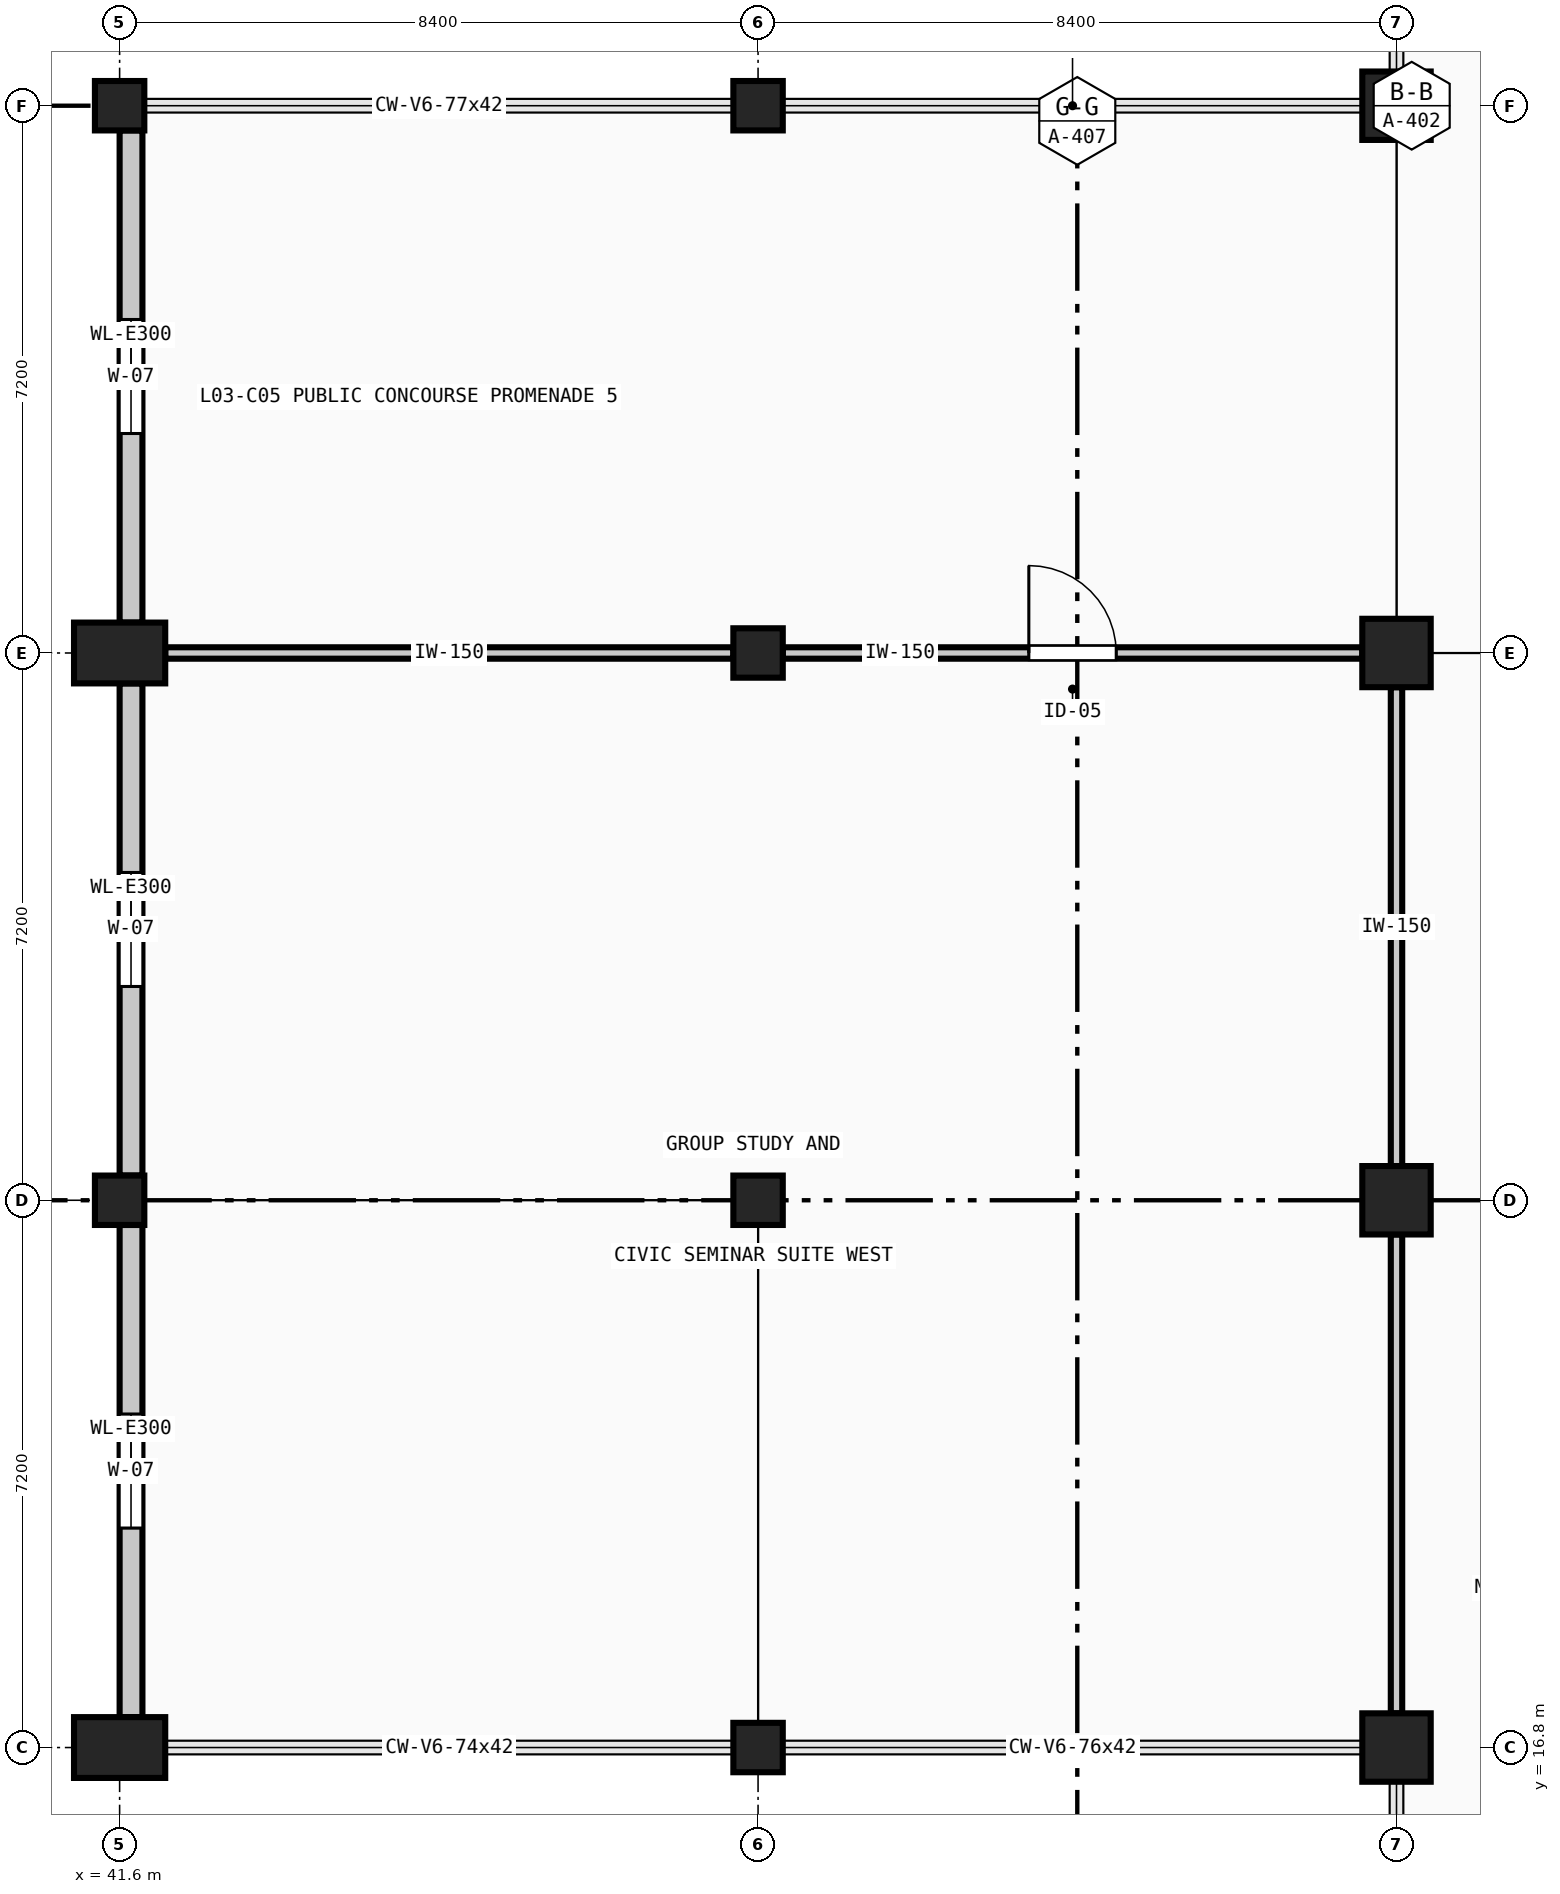
"""IFC4 building model, lengths in metres.
Left out: names, types, materials, properties, quantities, classifications, styles, units other than length and angle.
Written with IfcOpenShell. Run it as: python <this file> out.ifc"""

import sys

from ifc_helpers import new_model, si_unit, direction, frame, frame_2d, origin, origin_2d, place, context, subcontext, project, spatial, rectangle, extrude, element, fill, save


model = new_model("IFC4")
c1 = context("Model", 3, precision=1e-05, world=origin(), true_north=direction((0.0, 1.0)))
c2 = subcontext(c1, "Body", "Model", "MODEL_VIEW")
j1 = project(units=[si_unit("LENGTHUNIT", "METRE"), si_unit("PLANEANGLEUNIT", "RADIAN")], contexts=[c1])
p1 = place(None, origin())
s1 = spatial("IfcSite", under=j1, at=p1, CompositionType="ELEMENT")
p2 = place(p1, origin())
s2 = spatial("IfcBuilding", under=s1, at=p2, CompositionType="ELEMENT")
p3 = place(p2, frame((0.0, 0.0, 14.4)))
s3 = spatial("IfcBuildingStorey", under=s2, at=p3, CompositionType="ELEMENT", Elevation=14.4)
p4 = place(p3, frame((41.6, 16.8, 0.0), z_axis=(0.0, 0.0, 1.0), x_axis=(1.0, 0.0, 0.0)))
e1 = element("IfcColumn", 1, at=p4, inside=s3, PredefinedType="COLUMN", context=c2, shape_type="SweptSolid", body=[
    extrude(rectangle(XDim=1.2, YDim=0.8, at=origin_2d()), origin(), (0.0, 0.0, 1.0), 4.48),
])
p5 = place(p3, frame((41.6, 24.0, 0.0), z_axis=(0.0, 0.0, 1.0), x_axis=(1.0, 0.0, 0.0)))
e2 = element("IfcColumn", 2, at=p5, inside=s3, PredefinedType="COLUMN", context=c2, shape_type="SweptSolid", body=[
    extrude(rectangle(XDim=0.65, YDim=0.65, at=origin_2d()), origin(), (0.0, 0.0, 1.0), 4.48),
])
p6 = place(p3, frame((41.6, 31.2, 0.0), z_axis=(0.0, 0.0, 1.0), x_axis=(1.0, 0.0, 0.0)))
e3 = element("IfcColumn", 3, at=p6, inside=s3, PredefinedType="COLUMN", context=c2, shape_type="SweptSolid", body=[
    extrude(rectangle(XDim=1.2, YDim=0.8, at=origin_2d()), origin(), (0.0, 0.0, 1.0), 4.48),
])
for number, where, z_axis, x_axis in (
    (4, (41.6, 38.4, 0.0), (0.0, 0.0, 1.0), (1.0, 0.0, 0.0)),
    (5, (50.0, 16.8, 0.0), (0.0, 0.0, 1.0), (1.0, 0.0, 0.0)),
    (6, (50.0, 24.0, 0.0), (0.0, 0.0, 1.0), (1.0, 0.0, 0.0)),
    (7, (50.0, 31.2, 0.0), (0.0, 0.0, 1.0), (1.0, 0.0, 0.0)),
    (8, (50.0, 38.4, 0.0), (0.0, 0.0, 1.0), (1.0, 0.0, 0.0)),
):
    element("IfcColumn", number, at=place(p3, frame(where, z_axis=z_axis, x_axis=x_axis)), inside=s3, PredefinedType="COLUMN", context=c2, shape_type="SweptSolid", body=[
        extrude(rectangle(XDim=0.65, YDim=0.65, at=origin_2d()), origin(), (0.0, 0.0, 1.0), 4.48),
    ])
for number, where, z_axis, x_axis in (
    (9, (58.4, 16.8, 0.0), (0.0, 0.0, 1.0), (1.0, 0.0, 0.0)),
    (10, (58.4, 24.0, 0.0), (0.0, 0.0, 1.0), (1.0, 0.0, 0.0)),
    (11, (58.4, 31.2, 0.0), (0.0, 0.0, 1.0), (1.0, 0.0, 0.0)),
    (12, (58.4, 38.4, 0.0), (0.0, 0.0, 1.0), (1.0, 0.0, 0.0)),
):
    element("IfcColumn", number, at=place(p3, frame(where, z_axis=z_axis, x_axis=x_axis)), inside=s3, PredefinedType="COLUMN", context=c2, shape_type="SweptSolid", body=[
        extrude(rectangle(XDim=0.9, YDim=0.9, at=origin_2d()), origin(), (0.0, 0.0, 1.0), 4.48),
    ])
p7 = place(p3, frame((41.75, 17.2, 0.0), z_axis=(0.0, 0.0, 1.0), x_axis=(0.0, 1.0, 0.0)))
e13 = element("IfcWall", 13, at=p7, inside=s3, PredefinedType="SOLIDWALL", context=c2, shape_type="SweptSolid", body=[
    extrude(rectangle(XDim=6.475, YDim=0.3, at=frame_2d((3.238, 0.0))), origin(), (0.0, 0.0, 1.0), 4.23),
])
p8 = place(p7, frame((2.488, 0.0, 0.9)))
e14 = element("IfcOpeningElement", 14, at=p8, cuts=e13, PredefinedType="OPENING", context=c2, shape_type="SweptSolid", body=[
    extrude(rectangle(XDim=1.5, YDim=2.4, at=frame_2d((0.75, 1.2))), frame((0.0, 0.16, 0.0), z_axis=(0.0, -1.0, 0.0), x_axis=(1.0, 0.0, 0.0)), (0.0, 0.0, 1.0), 0.32),
])
p9 = place(p3, frame((41.75, 24.325, 0.0), z_axis=(0.0, 0.0, 1.0), x_axis=(0.0, 1.0, 0.0)))
e15 = element("IfcWall", 15, at=p9, inside=s3, PredefinedType="SOLIDWALL", context=c2, shape_type="SweptSolid", body=[
    extrude(rectangle(XDim=6.475, YDim=0.3, at=frame_2d((3.238, 0.0))), origin(), (0.0, 0.0, 1.0), 4.23),
])
p10 = place(p9, frame((2.488, 0.0, 0.9)))
e16 = element("IfcOpeningElement", 16, at=p10, cuts=e15, PredefinedType="OPENING", context=c2, shape_type="SweptSolid", body=[
    extrude(rectangle(XDim=1.5, YDim=2.4, at=frame_2d((0.75, 1.2))), frame((0.0, 0.16, 0.0), z_axis=(0.0, -1.0, 0.0), x_axis=(1.0, 0.0, 0.0)), (0.0, 0.0, 1.0), 0.32),
])
p11 = place(p3, frame((41.75, 31.6, 0.0), z_axis=(0.0, 0.0, 1.0), x_axis=(0.0, 1.0, 0.0)))
e17 = element("IfcWall", 17, at=p11, inside=s3, PredefinedType="SOLIDWALL", context=c2, shape_type="SweptSolid", body=[
    extrude(rectangle(XDim=6.475, YDim=0.3, at=frame_2d((3.237, 0.0))), origin(), (0.0, 0.0, 1.0), 4.23),
])
p12 = place(p11, frame((2.488, 0.0, 0.9)))
e18 = element("IfcOpeningElement", 18, at=p12, cuts=e17, PredefinedType="OPENING", context=c2, shape_type="SweptSolid", body=[
    extrude(rectangle(XDim=1.5, YDim=2.4, at=frame_2d((0.75, 1.2))), frame((0.0, 0.16, 0.0), z_axis=(0.0, -1.0, 0.0), x_axis=(1.0, 0.0, 0.0)), (0.0, 0.0, 1.0), 0.32),
])
p13 = place(p3, frame((42.2, 31.2, 0.0), z_axis=(0.0, 0.0, 1.0), x_axis=(1.0, 0.0, 0.0)))
e19 = element("IfcWall", 19, at=p13, inside=s3, PredefinedType="PARTITIONING", context=c2, shape_type="SweptSolid", body=[
    extrude(rectangle(XDim=7.475, YDim=0.15, at=frame_2d((3.738, 0.0))), origin(), (0.0, 0.0, 1.0), 4.23),
])
p14 = place(p3, frame((50.325, 31.2, 0.0), z_axis=(0.0, 0.0, 1.0), x_axis=(1.0, 0.0, 0.0)))
e20 = element("IfcWall", 20, at=p14, inside=s3, PredefinedType="PARTITIONING", context=c2, shape_type="SweptSolid", body=[
    extrude(rectangle(XDim=7.625, YDim=0.15, at=frame_2d((3.812, 0.0))), origin(), (0.0, 0.0, 1.0), 4.23),
])
p15 = place(p14, frame((3.238, 0.0, 0.0)))
e21 = element("IfcOpeningElement", 21, at=p15, cuts=e20, PredefinedType="OPENING", context=c2, shape_type="SweptSolid", body=[
    extrude(rectangle(XDim=1.15, YDim=2.2, at=frame_2d((0.575, 1.1))), frame((0.0, 0.085, 0.0), z_axis=(0.0, -1.0, 0.0), x_axis=(1.0, 0.0, 0.0)), (0.0, 0.0, 1.0), 0.17),
])
for number, where, z_axis, x_axis in (
    (22, (58.4, 30.75, 0.0), (0.0, 0.0, 1.0), (0.0, -1.0, 0.0)),
    (23, (58.4, 23.55, 0.0), (0.0, 0.0, 1.0), (0.0, -1.0, 0.0)),
):
    element("IfcWall", number, at=place(p3, frame(where, z_axis=z_axis, x_axis=x_axis)), inside=s3, PredefinedType="PARTITIONING", context=c2, shape_type="SweptSolid", body=[
        extrude(rectangle(XDim=6.3, YDim=0.15, at=frame_2d((3.15, 0.0))), origin(), (0.0, 0.0, 1.0), 3.28),
    ])
p16 = place(p8, origin())
e24 = element("IfcWindow", 24, at=p16, inside=s3, PartitioningType="SINGLE_PANEL", PredefinedType="WINDOW", context=c2, shape_type="SweptSolid", body=[
    extrude(rectangle(XDim=1.5, YDim=2.4, at=frame_2d((0.75, 1.2))), frame((0.0, 0.03, 0.0), z_axis=(0.0, -1.0, 0.0), x_axis=(1.0, 0.0, 0.0)), (0.0, 0.0, 1.0), 0.06),
])
fill(e14, e24)
p17 = place(p10, origin())
e25 = element("IfcWindow", 25, at=p17, inside=s3, PartitioningType="SINGLE_PANEL", PredefinedType="WINDOW", context=c2, shape_type="SweptSolid", body=[
    extrude(rectangle(XDim=1.5, YDim=2.4, at=frame_2d((0.75, 1.2))), frame((0.0, 0.03, 0.0), z_axis=(0.0, -1.0, 0.0), x_axis=(1.0, 0.0, 0.0)), (0.0, 0.0, 1.0), 0.06),
])
fill(e16, e25)
p18 = place(p12, origin())
e26 = element("IfcWindow", 26, at=p18, inside=s3, PartitioningType="SINGLE_PANEL", PredefinedType="WINDOW", context=c2, shape_type="SweptSolid", body=[
    extrude(rectangle(XDim=1.5, YDim=2.4, at=frame_2d((0.75, 1.2))), frame((0.0, 0.03, 0.0), z_axis=(0.0, -1.0, 0.0), x_axis=(1.0, 0.0, 0.0)), (0.0, 0.0, 1.0), 0.06),
])
fill(e18, e26)
p19 = place(p15, origin())
e27 = element("IfcDoor", 27, at=p19, inside=s3, OperationType="SINGLE_SWING_LEFT", PredefinedType="DOOR", context=c2, shape_type="SweptSolid", body=[
    extrude(rectangle(XDim=1.15, YDim=2.2, at=frame_2d((0.575, 1.1))), frame((0.0, 0.025, 0.0), z_axis=(0.0, -1.0, 0.0), x_axis=(1.0, 0.0, 0.0)), (0.0, 0.0, 1.0), 0.05),
])
fill(e21, e27)
save(model, sys.argv[1])
